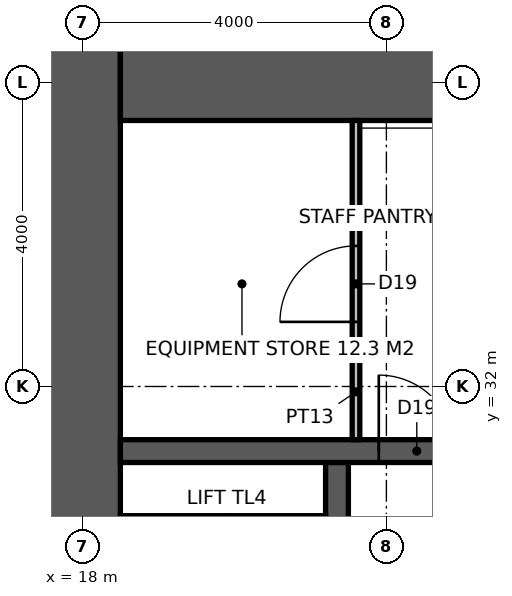
"""IFC4 building model, lengths in metres.
Left out: names, types, materials, properties, quantities, classifications, styles, units other than length and angle.
Written with IfcOpenShell. Run it as: python <this file> out.ifc"""

import sys

from ifc_helpers import new_model, si_unit, direction, frame, frame_2d, origin, place, context, subcontext, project, spatial, rectangle, extrude, element, fill, save


model = new_model("IFC4")
c1 = context("Model", 3, precision=1e-05, world=origin(), true_north=direction((0.0, 1.0)))
c2 = subcontext(c1, "Body", "Model", "MODEL_VIEW")
j1 = project(units=[si_unit("LENGTHUNIT", "METRE"), si_unit("PLANEANGLEUNIT", "RADIAN")], contexts=[c1])
p1 = place(None, origin())
s1 = spatial("IfcSite", under=j1, at=p1, CompositionType="ELEMENT")
p2 = place(p1, origin())
s2 = spatial("IfcBuilding", under=s1, at=p2, CompositionType="ELEMENT")
p3 = place(p2, frame((0.0, 0.0, 274.2)))
s3 = spatial("IfcBuildingStorey", under=s2, at=p3, CompositionType="ELEMENT", Elevation=274.2)
p4 = place(p3, frame((18.0, 17.5, -0.15), z_axis=(0.0, 0.0, 1.0), x_axis=(0.0, 1.0, 0.0)))
e1 = element("IfcWall", 1, at=p4, inside=s3, PredefinedType="SHEAR", context=c2, shape_type="SweptSolid", body=[
    extrude(rectangle(XDim=19.0, YDim=1.0, at=frame_2d((9.5, 0.0))), origin(), (0.0, 0.0, 1.0), 4.0),
])
p5 = place(p3, frame((18.5, 36.0, -0.15), z_axis=(0.0, 0.0, 1.0), x_axis=(1.0, 0.0, 0.0)))
e2 = element("IfcWall", 2, at=p5, inside=s3, PredefinedType="SHEAR", context=c2, shape_type="SweptSolid", body=[
    extrude(rectangle(XDim=17.6, YDim=1.0, at=frame_2d((8.8, 0.0))), origin(), (0.0, 0.0, 1.0), 4.0),
])
p6 = place(p3, frame((21.35, 18.5, -0.15), z_axis=(0.0, 0.0, 1.0), x_axis=(0.0, 1.0, 0.0)))
e3 = element("IfcWall", 3, at=p6, inside=s3, PredefinedType="SHEAR", context=c2, shape_type="SweptSolid", body=[
    extrude(rectangle(XDim=12.5, YDim=0.3, at=frame_2d((6.25, 0.0))), origin(), (0.0, 0.0, 1.0), 4.0),
])
p7 = place(p6, frame((0.875, 0.0, 0.15)))
e4 = element("IfcOpeningElement", 4, at=p7, cuts=e3, PredefinedType="OPENING", context=c2, shape_type="SweptSolid", body=[
    extrude(rectangle(XDim=1.1, YDim=2.2, at=frame_2d((0.55, 1.1))), frame((0.0, 0.16, 0.0), z_axis=(0.0, -1.0, 0.0), x_axis=(1.0, 0.0, 0.0)), (0.0, 0.0, 1.0), 0.32),
])
p8 = place(p6, frame((3.825, 0.0, 0.15)))
e5 = element("IfcOpeningElement", 5, at=p8, cuts=e3, PredefinedType="OPENING", context=c2, shape_type="SweptSolid", body=[
    extrude(rectangle(XDim=1.1, YDim=2.2, at=frame_2d((0.55, 1.1))), frame((0.0, 0.16, 0.0), z_axis=(0.0, -1.0, 0.0), x_axis=(1.0, 0.0, 0.0)), (0.0, 0.0, 1.0), 0.32),
])
p9 = place(p6, frame((6.675, 0.0, 0.15)))
e6 = element("IfcOpeningElement", 6, at=p9, cuts=e3, PredefinedType="OPENING", context=c2, shape_type="SweptSolid", body=[
    extrude(rectangle(XDim=1.1, YDim=2.2, at=frame_2d((0.55, 1.1))), frame((0.0, 0.16, 0.0), z_axis=(0.0, -1.0, 0.0), x_axis=(1.0, 0.0, 0.0)), (0.0, 0.0, 1.0), 0.32),
])
p10 = place(p6, frame((9.575, 0.0, 0.15)))
e7 = element("IfcOpeningElement", 7, at=p10, cuts=e3, PredefinedType="OPENING", context=c2, shape_type="SweptSolid", body=[
    extrude(rectangle(XDim=1.1, YDim=2.2, at=frame_2d((0.55, 1.1))), frame((0.0, 0.16, 0.0), z_axis=(0.0, -1.0, 0.0), x_axis=(1.0, 0.0, 0.0)), (0.0, 0.0, 1.0), 0.32),
])
p11 = place(p3, frame((18.5, 31.15, -0.15), z_axis=(0.0, 0.0, 1.0), x_axis=(1.0, 0.0, 0.0)))
e8 = element("IfcWall", 8, at=p11, inside=s3, PredefinedType="SHEAR", context=c2, shape_type="SweptSolid", body=[
    extrude(rectangle(XDim=5.35, YDim=0.3, at=frame_2d((2.675, 0.0))), origin(), (0.0, 0.0, 1.0), 4.0),
])
p12 = place(p11, frame((3.4, 0.0, 0.15)))
e9 = element("IfcOpeningElement", 9, at=p12, cuts=e8, PredefinedType="OPENING", context=c2, shape_type="SweptSolid", body=[
    extrude(rectangle(XDim=1.0, YDim=2.2, at=frame_2d((0.5, 1.1))), frame((0.0, 0.16, 0.0), z_axis=(0.0, -1.0, 0.0), x_axis=(1.0, 0.0, 0.0)), (0.0, 0.0, 1.0), 0.32),
])
p13 = place(p3, frame((21.6, 31.3, 0.0), z_axis=(0.0, 0.0, 1.0), x_axis=(0.0, 1.0, 0.0)))
e10 = element("IfcWall", 10, at=p13, inside=s3, PredefinedType="PARTITIONING", context=c2, shape_type="SweptSolid", body=[
    extrude(rectangle(XDim=4.2, YDim=0.1, at=frame_2d((2.1, 0.0))), origin(), (0.0, 0.0, 1.0), 3.85),
])
p14 = place(p13, frame((1.55, 0.0, 0.0)))
e11 = element("IfcOpeningElement", 11, at=p14, cuts=e10, PredefinedType="OPENING", context=c2, shape_type="SweptSolid", body=[
    extrude(rectangle(XDim=1.0, YDim=2.2, at=frame_2d((0.5, 1.1))), frame((0.0, 0.06, 0.0), z_axis=(0.0, -1.0, 0.0), x_axis=(1.0, 0.0, 0.0)), (0.0, 0.0, 1.0), 0.12),
])
p15 = place(p12, origin())
e12 = element("IfcDoor", 12, at=p15, inside=s3, OperationType="SINGLE_SWING_LEFT", PredefinedType="DOOR", context=c2, shape_type="SweptSolid", body=[
    extrude(rectangle(XDim=1.0, YDim=2.2, at=frame_2d((0.5, 1.1))), frame((0.0, 0.025, 0.0), z_axis=(0.0, -1.0, 0.0), x_axis=(1.0, 0.0, 0.0)), (0.0, 0.0, 1.0), 0.05),
])
fill(e9, e12)
p16 = place(p14, origin())
e13 = element("IfcDoor", 13, at=p16, inside=s3, OperationType="SINGLE_SWING_LEFT", PredefinedType="DOOR", context=c2, shape_type="SweptSolid", body=[
    extrude(rectangle(XDim=1.0, YDim=2.2, at=frame_2d((0.5, 1.1))), frame((0.0, 0.025, 0.0), z_axis=(0.0, -1.0, 0.0), x_axis=(1.0, 0.0, 0.0)), (0.0, 0.0, 1.0), 0.05),
])
fill(e11, e13)
save(model, sys.argv[1])
